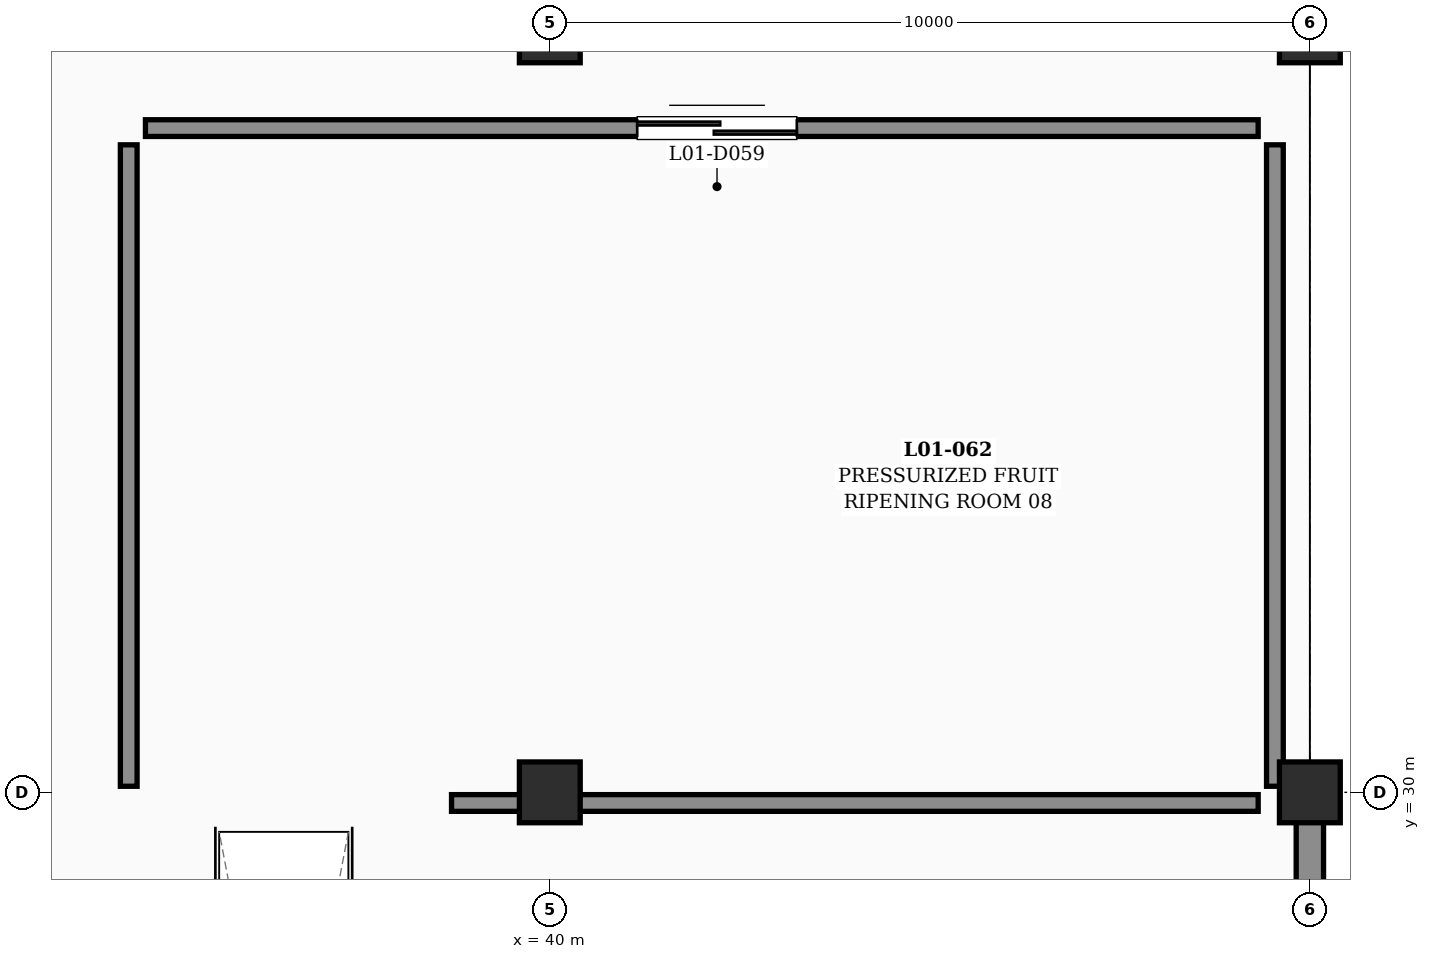
"""IFC4 building model, lengths in metres.
Left out: names, types, materials, properties, quantities, classifications, styles, units other than length and angle.
Written with IfcOpenShell. Run it as: python <this file> out.ifc"""

import sys

from ifc_helpers import new_model, si_unit, direction, frame, frame_2d, origin, origin_2d, place, context, subcontext, project, spatial, rectangle, extrude, element, fill, save


model = new_model("IFC4")
c1 = context("Model", 3, precision=1e-05, world=origin(), true_north=direction((0.0, 1.0)))
c2 = subcontext(c1, "Body", "Model", "MODEL_VIEW")
j1 = project(units=[si_unit("LENGTHUNIT", "METRE"), si_unit("PLANEANGLEUNIT", "RADIAN")], contexts=[c1])
p1 = place(None, origin())
s1 = spatial("IfcSite", under=j1, at=p1, CompositionType="ELEMENT")
p2 = place(p1, origin())
s2 = spatial("IfcBuilding", under=s1, at=p2, CompositionType="ELEMENT")
p3 = place(p2, frame((0.0, 0.0, 6.0)))
s3 = spatial("IfcBuildingStorey", under=s2, at=p3, CompositionType="ELEMENT", Elevation=6.0)
for number, where, z_axis, x_axis in (
    (1, (40.0, 30.0, 0.0), (0.0, 0.0, 1.0), (1.0, 0.0, 0.0)),
    (2, (40.0, 40.0, 0.0), (0.0, 0.0, 1.0), (1.0, 0.0, 0.0)),
    (3, (50.0, 30.0, 0.0), (0.0, 0.0, 1.0), (1.0, 0.0, 0.0)),
    (4, (50.0, 40.0, 0.0), (0.0, 0.0, 1.0), (1.0, 0.0, 0.0)),
):
    element("IfcColumn", number, at=place(p3, frame(where, z_axis=z_axis, x_axis=x_axis)), inside=s3, PredefinedType="COLUMN", context=c2, shape_type="SweptSolid", body=[
        extrude(rectangle(XDim=0.8, YDim=0.8, at=origin_2d()), origin(), (0.0, 0.0, 1.0), 4.8),
    ])
p4 = place(p3, frame((50.0, 20.24, 0.0), z_axis=(0.0, 0.0, 1.0), x_axis=(0.0, 1.0, 0.0)))
e5 = element("IfcWall", 5, at=p4, inside=s3, PredefinedType="SOLIDWALL", context=c2, shape_type="SweptSolid", body=[
    extrude(rectangle(XDim=9.52, YDim=0.36, at=frame_2d((4.76, 0.0))), origin(), (0.0, 0.0, 1.0), 3.61),
])
p5 = place(p4, frame((3.4, 0.0, 1.2)))
e6 = element("IfcOpeningElement", 6, at=p5, cuts=e5, PredefinedType="OPENING", context=c2, shape_type="SweptSolid", body=[
    extrude(rectangle(XDim=1.4, YDim=1.35, at=frame_2d((0.7, 0.675))), frame((0.0, 0.19, 0.0), z_axis=(0.0, -1.0, 0.0), x_axis=(1.0, 0.0, 0.0)), (0.0, 0.0, 1.0), 0.38),
])
p6 = place(p3, frame((34.46, 30.08, 0.0), z_axis=(0.0, 0.0, 1.0), x_axis=(0.0, 1.0, 0.0)))
e7 = element("IfcWall", 7, at=p6, inside=s3, PredefinedType="PARTITIONING", context=c2, shape_type="SweptSolid", body=[
    extrude(rectangle(XDim=8.44, YDim=0.22, at=frame_2d((4.22, 0.0))), origin(), (0.0, 0.0, 1.0), 4.46),
])
p7 = place(p3, frame((34.68, 38.74, 0.0), z_axis=(0.0, 0.0, 1.0), x_axis=(1.0, 0.0, 0.0)))
e8 = element("IfcWall", 8, at=p7, inside=s3, PredefinedType="PARTITIONING", context=c2, shape_type="SweptSolid", body=[
    extrude(rectangle(XDim=14.64, YDim=0.22, at=frame_2d((7.32, 0.0))), origin(), (0.0, 0.0, 1.0), 3.51),
])
p8 = place(p7, frame((6.47, 0.0, 0.0)))
e9 = element("IfcOpeningElement", 9, at=p8, cuts=e8, PredefinedType="OPENING", context=c2, shape_type="SweptSolid", body=[
    extrude(rectangle(XDim=2.1, YDim=2.4, at=frame_2d((1.05, 1.2))), frame((0.0, 0.12, 0.0), z_axis=(0.0, -1.0, 0.0), x_axis=(1.0, 0.0, 0.0)), (0.0, 0.0, 1.0), 0.24),
])
p9 = place(p3, frame((49.54, 38.52, 0.0), z_axis=(0.0, 0.0, 1.0), x_axis=(0.0, -1.0, 0.0)))
e10 = element("IfcWall", 10, at=p9, inside=s3, PredefinedType="PARTITIONING", context=c2, shape_type="SweptSolid", body=[
    extrude(rectangle(XDim=8.44, YDim=0.22, at=frame_2d((4.22, 0.0))), origin(), (0.0, 0.0, 1.0), 4.46),
])
p10 = place(p3, frame((49.32, 29.86, 0.0), z_axis=(0.0, 0.0, 1.0), x_axis=(-1.0, 0.0, 0.0)))
e11 = element("IfcWall", 11, at=p10, inside=s3, PredefinedType="PARTITIONING", context=c2, shape_type="SweptSolid", body=[
    extrude(rectangle(XDim=10.613, YDim=0.22, at=frame_2d((5.307, 0.0))), origin(), (0.0, 0.0, 1.0), 3.51),
])
p11 = place(p8, origin())
e12 = element("IfcDoor", 12, at=p11, inside=s3, OperationType="DOUBLE_DOOR_SLIDING", PredefinedType="DOOR", context=c2, shape_type="SweptSolid", body=[
    extrude(rectangle(XDim=2.1, YDim=2.4, at=frame_2d((1.05, 1.2))), frame((0.0, 0.025, 0.0), z_axis=(0.0, -1.0, 0.0), x_axis=(1.0, 0.0, 0.0)), (0.0, 0.0, 1.0), 0.05),
])
fill(e9, e12)
save(model, sys.argv[1])
